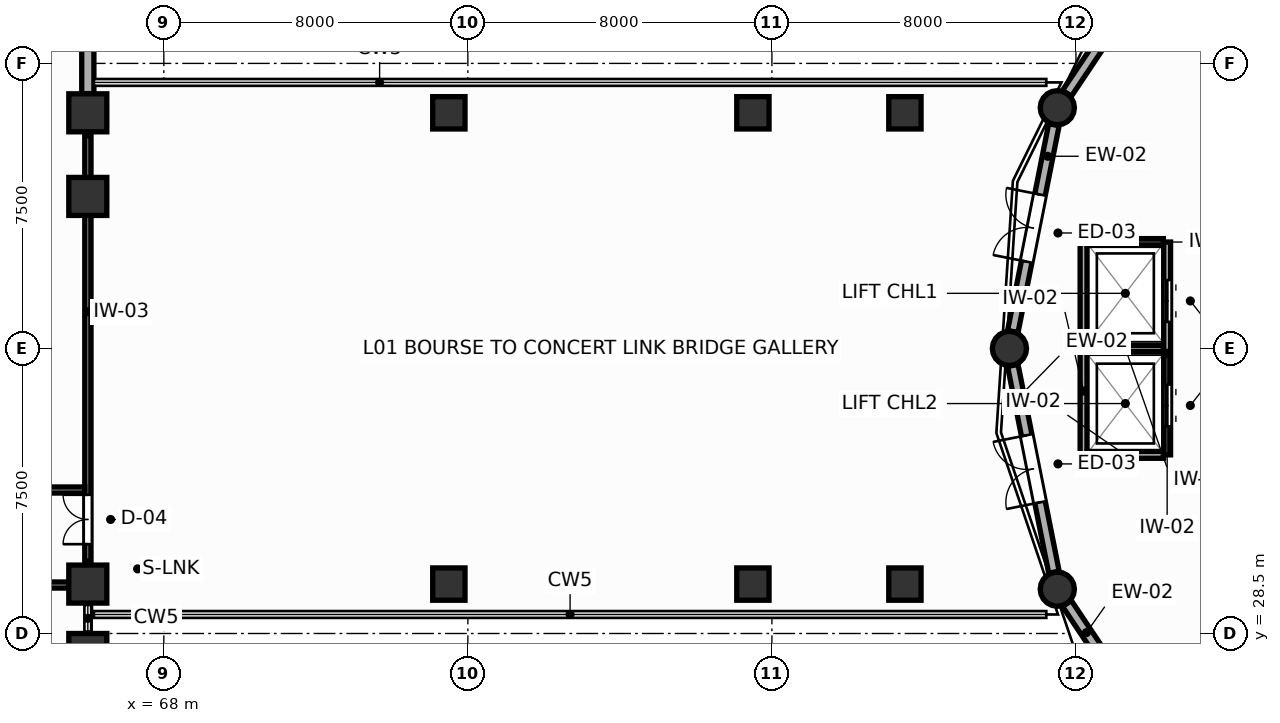
"""IFC4 building model, lengths in metres.
Left out: names, types, materials, properties, quantities, classifications, styles, units other than length and angle.
Written with IfcOpenShell. Run it as: python <this file> out.ifc"""

import sys

from ifc_helpers import new_model, si_unit, direction, frame, frame_2d, origin, origin_2d, place, context, subcontext, project, spatial, rectangle, circle, extrude, source, transform, mapped, element, fill, save


model = new_model("IFC4")
c1 = context("Model", 3, precision=1e-05, world=origin(), true_north=direction((0.0, 1.0)))
c2 = subcontext(c1, "Body", "Model", "MODEL_VIEW")
j1 = project(units=[si_unit("LENGTHUNIT", "METRE"), si_unit("PLANEANGLEUNIT", "RADIAN")], contexts=[c1])
p1 = place(None, origin())
s1 = spatial("IfcSite", under=j1, at=p1, CompositionType="ELEMENT")
p2 = place(p1, origin())
s2 = spatial("IfcBuilding", under=s1, at=p2, CompositionType="ELEMENT")
p3 = place(p2, frame((0.0, 0.0, 4.8)))
s3 = spatial("IfcBuildingStorey", under=s2, at=p3, CompositionType="ELEMENT", Elevation=4.8)
m1 = source(origin(), c2, "Body", "SweptSolid", [
    extrude(rectangle(XDim=1.0, YDim=1.0, at=origin_2d()), origin(), (0.0, 0.0, 1.0), 4.8),
])
for number, where, z_axis, x_axis in (
    (1, (66.0, 28.0, 0.0), (0.0, 0.0, 1.0), (1.0, 0.0, 0.0)),
    (2, (66.0, 40.0, 0.0), (0.0, 0.0, 1.0), (1.0, 0.0, 0.0)),
    (3, (66.0, 29.8, 0.0), (0.0, 0.0, 1.0), (1.0, 0.0, 0.0)),
    (4, (66.0, 42.2, 0.0), (0.0, 0.0, 1.0), (1.0, 0.0, 0.0)),
):
    element("IfcColumn", number, at=place(p3, frame(where, z_axis=z_axis, x_axis=x_axis)), inside=s3, PredefinedType="COLUMN", context=c2, shape_type="MappedRepresentation", body=[
        mapped(m1, transform((0.0, 0.0, 0.0), scale=1.0)),
    ])
m2 = source(origin(), c2, "Body", "SweptSolid", [
    extrude(rectangle(XDim=0.85, YDim=0.85, at=origin_2d()), origin(), (0.0, 0.0, 1.0), 4.8),
])
for number, where, z_axis, x_axis in (
    (5, (75.5, 29.8, 0.0), (0.0, 0.0, 1.0), (1.0, 0.0, 0.0)),
    (6, (75.5, 42.2, 0.0), (0.0, 0.0, 1.0), (1.0, 0.0, 0.0)),
    (7, (83.5, 29.8, 0.0), (0.0, 0.0, 1.0), (1.0, 0.0, 0.0)),
    (8, (83.5, 42.2, 0.0), (0.0, 0.0, 1.0), (1.0, 0.0, 0.0)),
    (9, (87.5, 29.8, 0.0), (0.0, 0.0, 1.0), (1.0, 0.0, 0.0)),
    (10, (87.5, 42.2, 0.0), (0.0, 0.0, 1.0), (1.0, 0.0, 0.0)),
):
    element("IfcColumn", number, at=place(p3, frame(where, z_axis=z_axis, x_axis=x_axis)), inside=s3, PredefinedType="COLUMN", context=c2, shape_type="MappedRepresentation", body=[
        mapped(m2, transform((0.0, 0.0, 0.0), scale=1.0)),
    ])
m3 = source(origin(), c2, "Body", "SweptSolid", [
    extrude(circle(Radius=0.45, at=origin_2d()), origin(), (0.0, 0.0, 1.0), 4.8),
])
for number, where, z_axis, x_axis in (
    (11, (91.51, 42.333, 0.0), (0.0, 0.0, 1.0), (1.0, 0.0, 0.0)),
    (12, (90.25, 36.0, 0.0), (0.0, 0.0, 1.0), (1.0, 0.0, 0.0)),
    (13, (91.51, 29.667, 0.0), (0.0, 0.0, 1.0), (1.0, 0.0, 0.0)),
):
    element("IfcColumn", number, at=place(p3, frame(where, z_axis=z_axis, x_axis=x_axis)), inside=s3, PredefinedType="COLUMN", context=c2, shape_type="MappedRepresentation", body=[
        mapped(m3, transform((0.0, 0.0, 0.0), scale=1.0)),
    ])
p4 = place(p3, frame((66.0, 42.705, 0.0), z_axis=(0.0, 0.0, 1.0), x_axis=(0.0, 1.0, 0.0)))
e14 = element("IfcWall", 14, at=p4, inside=s3, PredefinedType="SOLIDWALL", context=c2, shape_type="SweptSolid", body=[
    extrude(rectangle(XDim=7.27, YDim=0.32, at=frame_2d((3.635, 0.0))), origin(), (0.0, 0.0, 1.0), 3.82),
])
p5 = place(p4, frame((2.535, 0.0, 0.75)))
e15 = element("IfcOpeningElement", 15, at=p5, cuts=e14, PredefinedType="OPENING", context=c2, shape_type="SweptSolid", body=[
    extrude(rectangle(XDim=2.2, YDim=2.0, at=frame_2d((1.1, 1.0))), frame((0.0, 0.17, 0.0), z_axis=(0.0, -1.0, 0.0), x_axis=(1.0, 0.0, 0.0)), (0.0, 0.0, 1.0), 0.34),
])
p6 = place(p3, frame((94.844, 47.324, 0.0), z_axis=(0.0, 0.0, 1.0), x_axis=(-0.555542879373, -0.831487888774, 0.0)))
e16 = element("IfcWall", 16, at=p6, inside=s3, PredefinedType="SOLIDWALL", context=c2, shape_type="SweptSolid", body=[
    extrude(rectangle(XDim=5.547, YDim=0.28, at=frame_2d((2.774, 0.0))), origin(), (0.0, 0.0, 1.0), 3.95),
])
p7 = place(p6, frame((2.024, 0.0, 0.75)))
e17 = element("IfcOpeningElement", 17, at=p7, cuts=e16, PredefinedType="OPENING", context=c2, shape_type="SweptSolid", body=[
    extrude(rectangle(XDim=1.5, YDim=1.85, at=frame_2d((0.75, 0.925))), frame((0.0, 0.15, 0.0), z_axis=(0.0, -1.0, 0.0), x_axis=(1.0, 0.0, 0.0)), (0.0, 0.0, 1.0), 0.3),
])
p8 = place(p3, frame((91.421, 41.887, 0.0), z_axis=(0.0, 0.0, 1.0), x_axis=(-0.19504963768, -0.980793372144, 0.0)))
e18 = element("IfcWall", 18, at=p8, inside=s3, PredefinedType="SOLIDWALL", context=c2, shape_type="SweptSolid", body=[
    extrude(rectangle(XDim=5.547, YDim=0.28, at=frame_2d((2.774, 0.0))), origin(), (0.0, 0.0, 1.0), 3.95),
])
p9 = place(p8, frame((1.874, 0.0, 0.0)))
e19 = element("IfcOpeningElement", 19, at=p9, cuts=e18, PredefinedType="OPENING", context=c2, shape_type="SweptSolid", body=[
    extrude(rectangle(XDim=1.8, YDim=2.2, at=frame_2d((0.9, 1.1))), frame((0.0, 0.15, 0.0), z_axis=(0.0, -1.0, 0.0), x_axis=(1.0, 0.0, 0.0)), (0.0, 0.0, 1.0), 0.3),
])
p10 = place(p3, frame((90.339, 35.554, 0.0), z_axis=(0.0, 0.0, 1.0), x_axis=(0.19504963768, -0.980793372144, 0.0)))
e20 = element("IfcWall", 20, at=p10, inside=s3, PredefinedType="SOLIDWALL", context=c2, shape_type="SweptSolid", body=[
    extrude(rectangle(XDim=5.547, YDim=0.28, at=frame_2d((2.774, 0.0))), origin(), (0.0, 0.0, 1.0), 3.95),
])
p11 = place(p10, frame((1.874, 0.0, 0.0)))
e21 = element("IfcOpeningElement", 21, at=p11, cuts=e20, PredefinedType="OPENING", context=c2, shape_type="SweptSolid", body=[
    extrude(rectangle(XDim=1.8, YDim=2.2, at=frame_2d((0.9, 1.1))), frame((0.0, 0.15, 0.0), z_axis=(0.0, -1.0, 0.0), x_axis=(1.0, 0.0, 0.0)), (0.0, 0.0, 1.0), 0.3),
])
p12 = place(p3, frame((91.763, 29.288, 0.0), z_axis=(0.0, 0.0, 1.0), x_axis=(0.555542879373, -0.831487888774, 0.0)))
e22 = element("IfcWall", 22, at=p12, inside=s3, PredefinedType="SOLIDWALL", context=c2, shape_type="SweptSolid", body=[
    extrude(rectangle(XDim=5.547, YDim=0.28, at=frame_2d((2.774, 0.0))), origin(), (0.0, 0.0, 1.0), 3.95),
])
p13 = place(p12, frame((2.024, 0.0, 0.75)))
e23 = element("IfcOpeningElement", 23, at=p13, cuts=e22, PredefinedType="OPENING", context=c2, shape_type="SweptSolid", body=[
    extrude(rectangle(XDim=1.5, YDim=1.85, at=frame_2d((0.75, 0.925))), frame((0.0, 0.15, 0.0), z_axis=(0.0, -1.0, 0.0), x_axis=(1.0, 0.0, 0.0)), (0.0, 0.0, 1.0), 0.3),
])
p14 = place(p3, frame((94.4, 33.2, 0.0), z_axis=(0.0, 0.0, 1.0), x_axis=(0.0, 1.0, 0.0)))
e24 = element("IfcWall", 24, at=p14, inside=s3, PredefinedType="PARTITIONING", context=c2, shape_type="SweptSolid", body=[
    extrude(rectangle(XDim=5.6, YDim=0.18, at=frame_2d((2.8, 0.0))), origin(), (0.0, 0.0, 1.0), 4.52),
])
p15 = place(p14, frame((3.5, 0.0, 0.0)))
e25 = element("IfcOpeningElement", 25, at=p15, cuts=e24, PredefinedType="OPENING", context=c2, shape_type="SweptSolid", body=[
    extrude(rectangle(XDim=1.1, YDim=2.1, at=frame_2d((0.55, 1.05))), frame((0.0, 0.1, 0.0), z_axis=(0.0, -1.0, 0.0), x_axis=(1.0, 0.0, 0.0)), (0.0, 0.0, 1.0), 0.2),
])
p16 = place(p14, frame((0.75, 0.0, 0.0)))
e26 = element("IfcOpeningElement", 26, at=p16, cuts=e24, PredefinedType="OPENING", context=c2, shape_type="SweptSolid", body=[
    extrude(rectangle(XDim=1.1, YDim=2.1, at=frame_2d((0.55, 1.05))), frame((0.0, 0.1, 0.0), z_axis=(0.0, -1.0, 0.0), x_axis=(1.0, 0.0, 0.0)), (0.0, 0.0, 1.0), 0.2),
])
p17 = place(p3, frame((92.2, 33.2, 0.0), z_axis=(0.0, 0.0, 1.0), x_axis=(0.0, 1.0, 0.0)))
e27 = element("IfcWall", 27, at=p17, inside=s3, PredefinedType="PARTITIONING", context=c2, shape_type="SweptSolid", body=[
    extrude(rectangle(XDim=5.6, YDim=0.18, at=frame_2d((2.8, 0.0))), origin(), (0.0, 0.0, 1.0), 4.52),
])
for number, where, z_axis, x_axis in (
    (28, (92.3, 38.8, 0.0), (0.0, 0.0, 1.0), (1.0, 0.0, 0.0)),
    (29, (92.3, 33.2, 0.0), (0.0, 0.0, 1.0), (1.0, 0.0, 0.0)),
):
    element("IfcWall", number, at=place(p3, frame(where, z_axis=z_axis, x_axis=x_axis)), inside=s3, PredefinedType="PARTITIONING", context=c2, shape_type="SweptSolid", body=[
        extrude(rectangle(XDim=2.0, YDim=0.18, at=frame_2d((1.0, 0.0))), origin(), (0.0, 0.0, 1.0), 4.52),
    ])
p18 = place(p3, frame((92.3, 36.0, 0.0), z_axis=(0.0, 0.0, 1.0), x_axis=(1.0, 0.0, 0.0)))
e30 = element("IfcWall", 30, at=p18, inside=s3, PredefinedType="PARTITIONING", context=c2, shape_type="SweptSolid", body=[
    extrude(rectangle(XDim=2.0, YDim=0.16, at=frame_2d((1.0, 0.0))), origin(), (0.0, 0.0, 1.0), 4.52),
])
p19 = place(p3, frame((66.0, 30.4, 0.0), z_axis=(0.0, 0.0, 1.0), x_axis=(0.0, 1.0, 0.0)))
e31 = element("IfcWall", 31, at=p19, inside=s3, PredefinedType="PARTITIONING", context=c2, shape_type="SweptSolid", body=[
    extrude(rectangle(XDim=11.2, YDim=0.16, at=frame_2d((5.6, 0.0))), origin(), (0.0, 0.0, 1.0), 3.82),
])
p20 = place(p19, frame((0.45, 0.0, 0.0)))
e32 = element("IfcOpeningElement", 32, at=p20, cuts=e31, PredefinedType="OPENING", context=c2, shape_type="SweptSolid", body=[
    extrude(rectangle(XDim=1.3, YDim=2.1, at=frame_2d((0.65, 1.05))), frame((0.0, 0.09, 0.0), z_axis=(0.0, -1.0, 0.0), x_axis=(1.0, 0.0, 0.0)), (0.0, 0.0, 1.0), 0.18),
])
p21 = place(p3, frame((47.357, 29.775, 0.0), z_axis=(0.0, 0.0, 1.0), x_axis=(1.0, 0.0, 0.0)))
e33 = element("IfcWall", 33, at=p21, inside=s3, PredefinedType="PARTITIONING", context=c2, shape_type="SweptSolid", body=[
    extrude(rectangle(XDim=18.623, YDim=0.16, at=frame_2d((9.312, 0.0))), origin(), (0.0, 0.0, 1.0), 4.52),
])
p22 = place(p21, frame((4.795, 0.0, 0.0)))
e34 = element("IfcOpeningElement", 34, at=p22, cuts=e33, PredefinedType="OPENING", context=c2, shape_type="SweptSolid", body=[
    extrude(rectangle(XDim=0.95, YDim=2.05, at=frame_2d((0.475, 1.025))), frame((0.0, 0.09, 0.0), z_axis=(0.0, -1.0, 0.0), x_axis=(1.0, 0.0, 0.0)), (0.0, 0.0, 1.0), 0.18),
])
p23 = place(p21, frame((14.208, 0.0, 0.0)))
e35 = element("IfcOpeningElement", 35, at=p23, cuts=e33, PredefinedType="OPENING", context=c2, shape_type="SweptSolid", body=[
    extrude(rectangle(XDim=0.95, YDim=2.05, at=frame_2d((0.475, 1.025))), frame((0.0, 0.09, 0.0), z_axis=(0.0, -1.0, 0.0), x_axis=(1.0, 0.0, 0.0)), (0.0, 0.0, 1.0), 0.18),
])
p24 = place(p3, frame((47.357, 32.275, 0.0), z_axis=(0.0, 0.0, 1.0), x_axis=(1.0, 0.0, 0.0)))
e36 = element("IfcWall", 36, at=p24, inside=s3, PredefinedType="PARTITIONING", context=c2, shape_type="SweptSolid", body=[
    extrude(rectangle(XDim=18.561, YDim=0.16, at=frame_2d((9.281, 0.0))), origin(), (0.0, 0.0, 1.0), 3.82),
])
p25 = place(p9, frame((1.8, 0.0, 0.0), z_axis=(0.0, 0.0, 1.0), x_axis=(-1.0, 0.0, 0.0)))
e37 = element("IfcDoor", 37, at=p25, inside=s3, OperationType="DOUBLE_DOOR_SINGLE_SWING", PredefinedType="DOOR", context=c2, shape_type="SweptSolid", body=[
    extrude(rectangle(XDim=1.8, YDim=2.2, at=frame_2d((0.9, 1.1))), frame((0.0, 0.025, 0.0), z_axis=(0.0, -1.0, 0.0), x_axis=(1.0, 0.0, 0.0)), (0.0, 0.0, 1.0), 0.05),
])
fill(e19, e37)
p26 = place(p11, frame((1.8, 0.0, 0.0), z_axis=(0.0, 0.0, 1.0), x_axis=(-1.0, 0.0, 0.0)))
e38 = element("IfcDoor", 38, at=p26, inside=s3, OperationType="DOUBLE_DOOR_SINGLE_SWING", PredefinedType="DOOR", context=c2, shape_type="SweptSolid", body=[
    extrude(rectangle(XDim=1.8, YDim=2.2, at=frame_2d((0.9, 1.1))), frame((0.0, 0.025, 0.0), z_axis=(0.0, -1.0, 0.0), x_axis=(1.0, 0.0, 0.0)), (0.0, 0.0, 1.0), 0.05),
])
fill(e21, e38)
p27 = place(p15, origin())
e39 = element("IfcDoor", 39, at=p27, inside=s3, OperationType="DOUBLE_DOOR_SLIDING", PredefinedType="DOOR", context=c2, shape_type="SweptSolid", body=[
    extrude(rectangle(XDim=1.1, YDim=2.1, at=frame_2d((0.55, 1.05))), frame((0.0, 0.025, 0.0), z_axis=(0.0, -1.0, 0.0), x_axis=(1.0, 0.0, 0.0)), (0.0, 0.0, 1.0), 0.05),
])
fill(e25, e39)
p28 = place(p16, origin())
e40 = element("IfcDoor", 40, at=p28, inside=s3, OperationType="DOUBLE_DOOR_SLIDING", PredefinedType="DOOR", context=c2, shape_type="SweptSolid", body=[
    extrude(rectangle(XDim=1.1, YDim=2.1, at=frame_2d((0.55, 1.05))), frame((0.0, 0.025, 0.0), z_axis=(0.0, -1.0, 0.0), x_axis=(1.0, 0.0, 0.0)), (0.0, 0.0, 1.0), 0.05),
])
fill(e26, e40)
p29 = place(p20, origin())
e41 = element("IfcDoor", 41, at=p29, inside=s3, OperationType="DOUBLE_DOOR_SINGLE_SWING", PredefinedType="DOOR", context=c2, shape_type="SweptSolid", body=[
    extrude(rectangle(XDim=1.3, YDim=2.1, at=frame_2d((0.65, 1.05))), frame((0.0, 0.025, 0.0), z_axis=(0.0, -1.0, 0.0), x_axis=(1.0, 0.0, 0.0)), (0.0, 0.0, 1.0), 0.05),
])
fill(e32, e41)
save(model, sys.argv[1])
